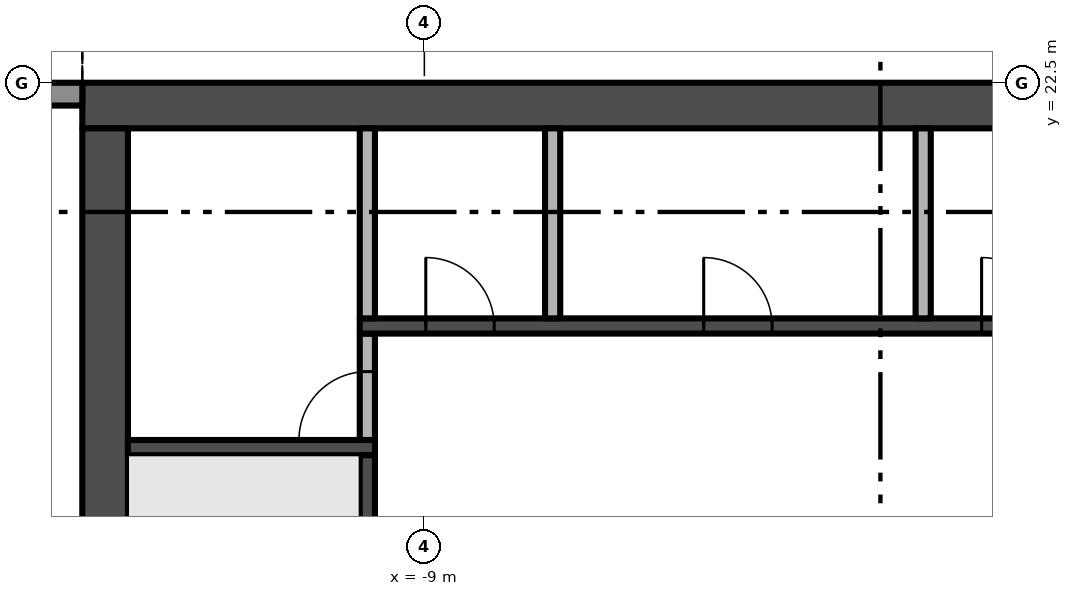
"""IFC4 building model, lengths in metres.
Left out: names, types, materials, properties, quantities, classifications, styles, units other than length and angle.
Written with IfcOpenShell. Run it as: python <this file> out.ifc"""

import sys

from ifc_helpers import new_model, si_unit, direction, frame, frame_2d, origin, place, context, subcontext, project, spatial, polyline, rectangle, outline, extrude, element, fill, save


model = new_model("IFC4")
c1 = context("Model", 3, precision=1e-05, world=origin(), true_north=direction((0.0, 1.0)))
c2 = subcontext(c1, "Body", "Model", "MODEL_VIEW")
j1 = project(units=[si_unit("LENGTHUNIT", "METRE"), si_unit("PLANEANGLEUNIT", "RADIAN")], contexts=[c1])
p1 = place(None, origin())
s1 = spatial("IfcSite", under=j1, at=p1, CompositionType="ELEMENT")
p2 = place(p1, origin())
s2 = spatial("IfcBuilding", under=s1, at=p2, CompositionType="ELEMENT")
p3 = place(p2, frame((0.0, 0.0, 254.0)))
s3 = spatial("IfcBuildingStorey", under=s2, at=p3, CompositionType="ELEMENT", Elevation=254.0)
p4 = place(p3, frame((13.5, 22.2, -0.3), z_axis=(0.0, 0.0, 1.0), x_axis=(-1.0, 0.0, 0.0)))
e1 = element("IfcWall", 1, at=p4, inside=s3, PredefinedType="SHEAR", context=c2, shape_type="SweptSolid", body=[
    extrude(rectangle(XDim=27.0, YDim=0.6, at=frame_2d((13.5, 0.0))), origin(), (0.0, 0.0, 1.0), 3.8),
])
p5 = place(p3, frame((-13.2, 21.9, -0.3), z_axis=(0.0, 0.0, 1.0), x_axis=(0.0, -1.0, 0.0)))
e2 = element("IfcWall", 2, at=p5, inside=s3, PredefinedType="SHEAR", context=c2, shape_type="SweptSolid", body=[
    extrude(rectangle(XDim=16.8, YDim=0.6, at=frame_2d((8.4, 0.0))), origin(), (0.0, 0.0, 1.0), 3.8),
])
p6 = place(p5, frame((9.3, 0.0, 0.3)))
e3 = element("IfcOpeningElement", 3, at=p6, cuts=e2, PredefinedType="OPENING", context=c2, shape_type="SweptSolid", body=[
    extrude(rectangle(XDim=1.2, YDim=2.2, at=frame_2d((0.6, 1.1))), frame((0.0, 0.31, 0.0), z_axis=(0.0, -1.0, 0.0), x_axis=(1.0, 0.0, 0.0)), (0.0, 0.0, 1.0), 0.62),
])
p7 = place(p3, frame((-17.55, 22.35, 0.0), z_axis=(0.0, 0.0, 1.0), x_axis=(1.0, 0.0, 0.0)))
e4 = element("IfcWall", 4, at=p7, inside=s3, PredefinedType="SOLIDWALL", context=c2, shape_type="SweptSolid", body=[
    extrude(rectangle(XDim=4.05, YDim=0.3, at=frame_2d((2.025, 0.0))), origin(), (0.0, 0.0, 1.0), 3.5),
])
p8 = place(p7, frame((1.1, 0.0, 0.0)))
e5 = element("IfcOpeningElement", 5, at=p8, cuts=e4, PredefinedType="OPENING", context=c2, shape_type="SweptSolid", body=[
    extrude(rectangle(XDim=2.4, YDim=2.4, at=frame_2d((1.2, 1.2))), frame((0.0, 0.16, 0.0), z_axis=(0.0, -1.0, 0.0), x_axis=(1.0, 0.0, 0.0)), (0.0, 0.0, 1.0), 0.32),
])
p9 = place(p7, frame((0.3, 0.0, 0.45)))
e6 = element("IfcOpeningElement", 6, at=p9, cuts=e4, PredefinedType="OPENING", context=c2, shape_type="SweptSolid", body=[
    extrude(rectangle(XDim=0.65, YDim=2.65, at=frame_2d((0.325, 1.325))), frame((0.0, 0.16, 0.0), z_axis=(0.0, -1.0, 0.0), x_axis=(1.0, 0.0, 0.0)), (0.0, 0.0, 1.0), 0.32),
])
p10 = place(p3, origin())
e7 = element("IfcWall", 7, at=p10, inside=s3, PredefinedType="USERDEFINED", context=c2, shape_type="SweptSolid", body=[
    extrude(outline(polyline([(-13.5, 25.149), (-15.0, 24.488), (-16.5, 23.755), (-18.0, 23.231), (-19.125, 23.1), (-19.5, 23.115), (-21.0, 23.451), (-22.5, 24.112), (-22.601, 23.883), (-21.079, 23.213), (-19.533, 22.866), (-19.115, 22.849), (-17.944, 22.986), (-16.404, 23.524), (-14.895, 24.261), (-13.399, 24.92), (-13.5, 25.149)])), origin(), (0.0, 0.0, 1.0), 0.9),
])
p11 = place(p3, frame((-12.9, 17.7, 0.0), z_axis=(0.0, 0.0, 1.0), x_axis=(1.0, 0.0, 0.0)))
e8 = element("IfcWall", 8, at=p11, inside=s3, PredefinedType="SHEAR", context=c2, shape_type="SweptSolid", body=[
    extrude(rectangle(XDim=3.25, YDim=0.2, at=frame_2d((1.625, 0.0))), origin(), (0.0, 0.0, 1.0), 3.5),
])
p12 = place(p3, frame((-9.75, 16.1, 0.0), z_axis=(0.0, 0.0, 1.0), x_axis=(0.0, 1.0, 0.0)))
e9 = element("IfcWall", 9, at=p12, inside=s3, PredefinedType="SHEAR", context=c2, shape_type="SweptSolid", body=[
    extrude(rectangle(XDim=1.5, YDim=0.2, at=frame_2d((0.75, 0.0))), origin(), (0.0, 0.0, 1.0), 3.5),
])
p13 = place(p3, frame((-9.75, 17.8, 0.0), z_axis=(0.0, 0.0, 1.0), x_axis=(0.0, 1.0, 0.0)))
e10 = element("IfcWall", 10, at=p13, inside=s3, PredefinedType="PARTITIONING", context=c2, shape_type="SweptSolid", body=[
    extrude(rectangle(XDim=1.4, YDim=0.2, at=frame_2d((0.7, 0.0))), origin(), (0.0, 0.0, 1.0), 3.5),
])
p14 = place(p13, origin())
e11 = element("IfcOpeningElement", 11, at=p14, cuts=e10, PredefinedType="OPENING", context=c2, shape_type="SweptSolid", body=[
    extrude(rectangle(XDim=0.9, YDim=2.1, at=frame_2d((0.45, 1.05))), frame((0.0, 0.11, 0.0), z_axis=(0.0, -1.0, 0.0), x_axis=(1.0, 0.0, 0.0)), (0.0, 0.0, 1.0), 0.22),
])
p15 = place(p3, frame((-9.85, 19.3, 0.0), z_axis=(0.0, 0.0, 1.0), x_axis=(1.0, 0.0, 0.0)))
e12 = element("IfcWall", 12, at=p15, inside=s3, PredefinedType="SHEAR", context=c2, shape_type="SweptSolid", body=[
    extrude(rectangle(XDim=19.7, YDim=0.2, at=frame_2d((9.85, 0.0))), origin(), (0.0, 0.0, 1.0), 3.5),
])
p16 = place(p15, frame((10.519, 0.0, 0.0)))
e13 = element("IfcOpeningElement", 13, at=p16, cuts=e12, PredefinedType="OPENING", context=c2, shape_type="SweptSolid", body=[
    extrude(rectangle(XDim=1.1, YDim=2.1, at=frame_2d((0.55, 1.05))), frame((0.0, 0.11, 0.0), z_axis=(0.0, -1.0, 0.0), x_axis=(1.0, 0.0, 0.0)), (0.0, 0.0, 1.0), 0.22),
])
p17 = place(p15, frame((12.956, 0.0, 0.0)))
e14 = element("IfcOpeningElement", 14, at=p17, cuts=e12, PredefinedType="OPENING", context=c2, shape_type="SweptSolid", body=[
    extrude(rectangle(XDim=1.1, YDim=2.1, at=frame_2d((0.55, 1.05))), frame((0.0, 0.11, 0.0), z_axis=(0.0, -1.0, 0.0), x_axis=(1.0, 0.0, 0.0)), (0.0, 0.0, 1.0), 0.22),
])
p18 = place(p15, frame((15.394, 0.0, 0.0)))
e15 = element("IfcOpeningElement", 15, at=p18, cuts=e12, PredefinedType="OPENING", context=c2, shape_type="SweptSolid", body=[
    extrude(rectangle(XDim=1.1, YDim=2.1, at=frame_2d((0.55, 1.05))), frame((0.0, 0.11, 0.0), z_axis=(0.0, -1.0, 0.0), x_axis=(1.0, 0.0, 0.0)), (0.0, 0.0, 1.0), 0.22),
])
p19 = place(p15, frame((17.831, 0.0, 0.0)))
e16 = element("IfcOpeningElement", 16, at=p19, cuts=e12, PredefinedType="OPENING", context=c2, shape_type="SweptSolid", body=[
    extrude(rectangle(XDim=1.1, YDim=2.1, at=frame_2d((0.55, 1.05))), frame((0.0, 0.11, 0.0), z_axis=(0.0, -1.0, 0.0), x_axis=(1.0, 0.0, 0.0)), (0.0, 0.0, 1.0), 0.22),
])
p20 = place(p15, frame((0.869, 0.0, 0.0)))
e17 = element("IfcOpeningElement", 17, at=p20, cuts=e12, PredefinedType="OPENING", context=c2, shape_type="SweptSolid", body=[
    extrude(rectangle(XDim=0.9, YDim=2.1, at=frame_2d((0.45, 1.05))), frame((0.0, 0.11, 0.0), z_axis=(0.0, -1.0, 0.0), x_axis=(1.0, 0.0, 0.0)), (0.0, 0.0, 1.0), 0.22),
])
p21 = place(p15, frame((4.525, 0.0, 0.0)))
e18 = element("IfcOpeningElement", 18, at=p21, cuts=e12, PredefinedType="OPENING", context=c2, shape_type="SweptSolid", body=[
    extrude(rectangle(XDim=0.9, YDim=2.1, at=frame_2d((0.45, 1.05))), frame((0.0, 0.11, 0.0), z_axis=(0.0, -1.0, 0.0), x_axis=(1.0, 0.0, 0.0)), (0.0, 0.0, 1.0), 0.22),
])
p22 = place(p15, frame((8.181, 0.0, 0.0)))
e19 = element("IfcOpeningElement", 19, at=p22, cuts=e12, PredefinedType="OPENING", context=c2, shape_type="SweptSolid", body=[
    extrude(rectangle(XDim=0.9, YDim=2.1, at=frame_2d((0.45, 1.05))), frame((0.0, 0.11, 0.0), z_axis=(0.0, -1.0, 0.0), x_axis=(1.0, 0.0, 0.0)), (0.0, 0.0, 1.0), 0.22),
])
for number, where, z_axis, x_axis in (
    (20, (-9.75, 19.4, 0.0), (0.0, 0.0, 1.0), (0.0, 1.0, 0.0)),
    (21, (-7.312, 19.4, 0.0), (0.0, 0.0, 1.0), (0.0, 1.0, 0.0)),
    (22, (-2.438, 19.4, 0.0), (0.0, 0.0, 1.0), (0.0, 1.0, 0.0)),
):
    element("IfcWall", number, at=place(p3, frame(where, z_axis=z_axis, x_axis=x_axis)), inside=s3, PredefinedType="PARTITIONING", context=c2, shape_type="SweptSolid", body=[
        extrude(rectangle(XDim=2.5, YDim=0.2, at=frame_2d((1.25, 0.0))), origin(), (0.0, 0.0, 1.0), 3.5),
    ])
p23 = place(p14, origin())
e23 = element("IfcDoor", 23, at=p23, inside=s3, OperationType="SINGLE_SWING_LEFT", PredefinedType="DOOR", context=c2, shape_type="SweptSolid", body=[
    extrude(rectangle(XDim=0.9, YDim=2.1, at=frame_2d((0.45, 1.05))), frame((0.0, 0.025, 0.0), z_axis=(0.0, -1.0, 0.0), x_axis=(1.0, 0.0, 0.0)), (0.0, 0.0, 1.0), 0.05),
])
fill(e11, e23)
p24 = place(p20, origin())
e24 = element("IfcDoor", 24, at=p24, inside=s3, OperationType="SINGLE_SWING_LEFT", PredefinedType="DOOR", context=c2, shape_type="SweptSolid", body=[
    extrude(rectangle(XDim=0.9, YDim=2.1, at=frame_2d((0.45, 1.05))), frame((0.0, 0.025, 0.0), z_axis=(0.0, -1.0, 0.0), x_axis=(1.0, 0.0, 0.0)), (0.0, 0.0, 1.0), 0.05),
])
fill(e17, e24)
p25 = place(p21, origin())
e25 = element("IfcDoor", 25, at=p25, inside=s3, OperationType="SINGLE_SWING_LEFT", PredefinedType="DOOR", context=c2, shape_type="SweptSolid", body=[
    extrude(rectangle(XDim=0.9, YDim=2.1, at=frame_2d((0.45, 1.05))), frame((0.0, 0.025, 0.0), z_axis=(0.0, -1.0, 0.0), x_axis=(1.0, 0.0, 0.0)), (0.0, 0.0, 1.0), 0.05),
])
fill(e18, e25)
p26 = place(p22, origin())
e26 = element("IfcDoor", 26, at=p26, inside=s3, OperationType="SINGLE_SWING_LEFT", PredefinedType="DOOR", context=c2, shape_type="SweptSolid", body=[
    extrude(rectangle(XDim=0.9, YDim=2.1, at=frame_2d((0.45, 1.05))), frame((0.0, 0.025, 0.0), z_axis=(0.0, -1.0, 0.0), x_axis=(1.0, 0.0, 0.0)), (0.0, 0.0, 1.0), 0.05),
])
fill(e19, e26)
save(model, sys.argv[1])
